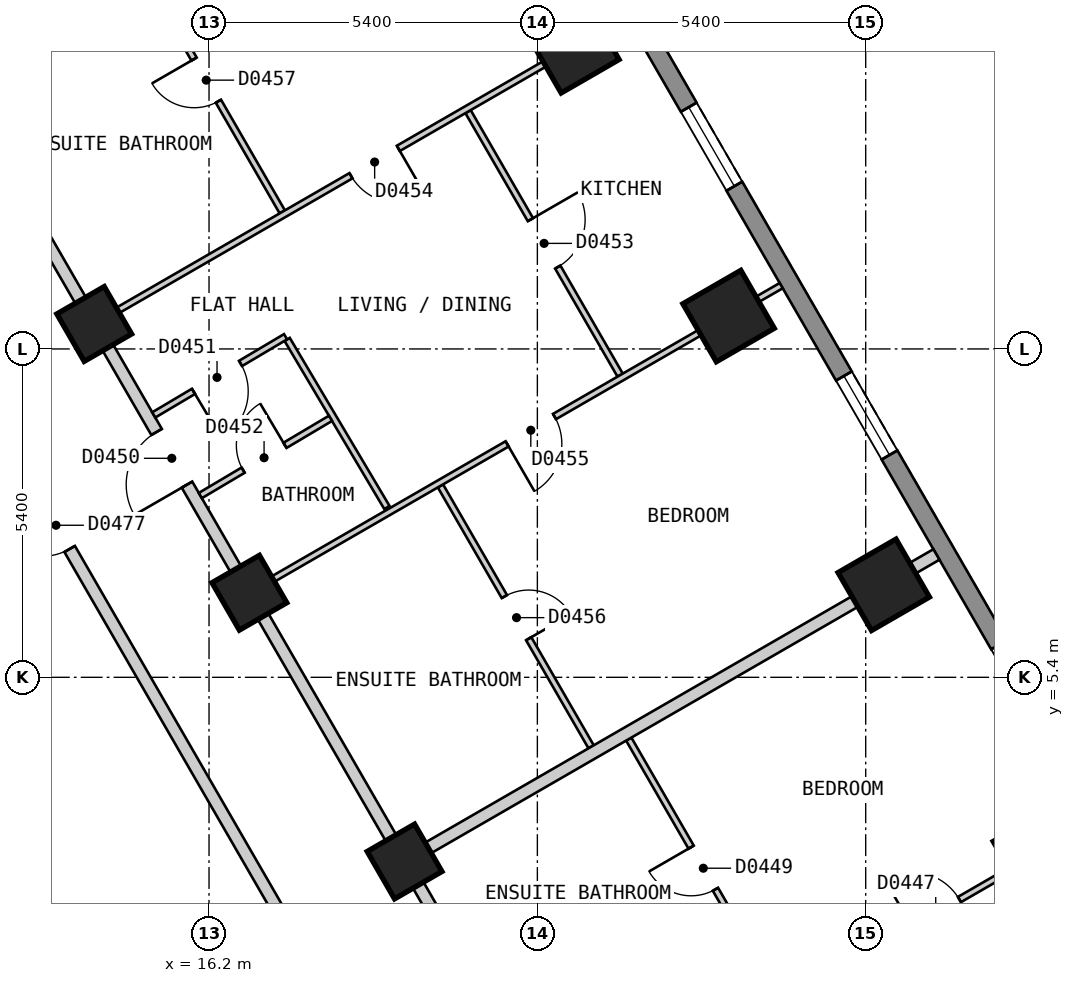
"""IFC4 building model, lengths in metres.
Left out: names, types, materials, properties, quantities, classifications, styles, units other than length and angle.
Written with IfcOpenShell. Run it as: python <this file> out.ifc"""

import sys

from ifc_helpers import new_model, si_unit, direction, frame, frame_2d, origin, origin_2d, place, context, subcontext, project, spatial, polyline, rectangle, outline, extrude, element, fill, save


model = new_model("IFC4")
c1 = context("Model", 3, precision=1e-05, world=origin(), true_north=direction((0.0, 1.0)))
c2 = subcontext(c1, "Body", "Model", "MODEL_VIEW")
j1 = project(units=[si_unit("LENGTHUNIT", "METRE"), si_unit("PLANEANGLEUNIT", "RADIAN")], contexts=[c1])
p1 = place(None, origin())
s1 = spatial("IfcSite", under=j1, at=p1, CompositionType="ELEMENT")
p2 = place(p1, origin())
s2 = spatial("IfcBuilding", under=s1, at=p2, CompositionType="ELEMENT")
p3 = place(p2, frame((0.0, 0.0, 32.4)))
s3 = spatial("IfcBuildingStorey", under=s2, at=p3, CompositionType="ELEMENT", Elevation=32.4)
for number, where, z_axis, x_axis in (
    (1, (29.848, 2.5, 0.0), (0.0, 0.0, 1.0), (-0.5, 0.866, 0.0)),
    (2, (27.297, 6.921, 0.0), (0.0, 0.0, 1.0), (-0.5, 0.866, 0.0)),
    (3, (24.745, 11.341, 0.0), (0.0, 0.0, 1.0), (-0.5, 0.866, 0.0)),
    (4, (22.193, 15.761, 0.0), (0.0, 0.0, 1.0), (-0.5, 0.866, 0.0)),
):
    element("IfcColumn", number, at=place(p3, frame(where, z_axis=z_axis, x_axis=x_axis)), inside=s3, PredefinedType="COLUMN", context=c2, shape_type="SweptSolid", body=[
        extrude(rectangle(XDim=1.1, YDim=1.1, at=origin_2d()), origin(), (0.0, 0.0, 1.0), 3.0),
    ])
for number, where, z_axis, x_axis in (
    (5, (19.416, 2.371, 0.0), (0.0, 0.0, 1.0), (-0.5, 0.866, 0.0)),
    (6, (16.864, 6.791, 0.0), (0.0, 0.0, 1.0), (-0.5, 0.866, 0.0)),
    (7, (14.312, 11.211, 0.0), (0.0, 0.0, 1.0), (-0.5, 0.866, 0.0)),
):
    element("IfcColumn", number, at=place(p3, frame(where, z_axis=z_axis, x_axis=x_axis)), inside=s3, PredefinedType="COLUMN", context=c2, shape_type="SweptSolid", body=[
        extrude(rectangle(XDim=0.9, YDim=0.9, at=origin_2d()), origin(), (0.0, 0.0, 1.0), 3.0),
    ])
p4 = place(p3, frame((31.22, 2.425, 0.0), z_axis=(0.0, 0.0, 1.0), x_axis=(-0.500001938803, 0.866024284413, 0.0)))
e8 = element("IfcWall", 8, at=p4, inside=s3, PredefinedType="SOLIDWALL", context=c2, shape_type="SweptSolid", body=[
    extrude(outline(polyline([(0.0, -0.15), (27.02, -0.15), (26.94, 0.15), (0.08, 0.15), (0.0, -0.15)])), origin(), (0.0, 0.0, 1.0), 2.7),
])
p5 = place(p4, frame((2.553, 0.0, 0.15)))
e9 = element("IfcOpeningElement", 9, at=p5, cuts=e8, PredefinedType="OPENING", context=c2, shape_type="SweptSolid", body=[
    extrude(rectangle(XDim=1.5, YDim=2.1, at=frame_2d((0.75, 1.05))), frame((0.0, 0.16, 0.0), z_axis=(0.0, -1.0, 0.0), x_axis=(1.0, 0.0, 0.0)), (0.0, 0.0, 1.0), 0.32),
])
p6 = place(p4, frame((7.657, 0.0, 0.15)))
e10 = element("IfcOpeningElement", 10, at=p6, cuts=e8, PredefinedType="OPENING", context=c2, shape_type="SweptSolid", body=[
    extrude(rectangle(XDim=1.5, YDim=2.1, at=frame_2d((0.75, 1.05))), frame((0.0, 0.16, 0.0), z_axis=(0.0, -1.0, 0.0), x_axis=(1.0, 0.0, 0.0)), (0.0, 0.0, 1.0), 0.32),
])
p7 = place(p4, frame((12.761, 0.0, 0.15)))
e11 = element("IfcOpeningElement", 11, at=p7, cuts=e8, PredefinedType="OPENING", context=c2, shape_type="SweptSolid", body=[
    extrude(rectangle(XDim=1.5, YDim=2.1, at=frame_2d((0.75, 1.05))), frame((0.0, 0.16, 0.0), z_axis=(0.0, -1.0, 0.0), x_axis=(1.0, 0.0, 0.0)), (0.0, 0.0, 1.0), 0.32),
])
p8 = place(p4, frame((17.865, 0.0, 0.15)))
e12 = element("IfcOpeningElement", 12, at=p8, cuts=e8, PredefinedType="OPENING", context=c2, shape_type="SweptSolid", body=[
    extrude(rectangle(XDim=1.5, YDim=2.1, at=frame_2d((0.75, 1.05))), frame((0.0, 0.16, 0.0), z_axis=(0.0, -1.0, 0.0), x_axis=(1.0, 0.0, 0.0)), (0.0, 0.0, 1.0), 0.32),
])
p9 = place(p4, frame((22.969, 0.0, 0.15)))
e13 = element("IfcOpeningElement", 13, at=p9, cuts=e8, PredefinedType="OPENING", context=c2, shape_type="SweptSolid", body=[
    extrude(rectangle(XDim=1.5, YDim=2.1, at=frame_2d((0.75, 1.05))), frame((0.0, 0.16, 0.0), z_axis=(0.0, -1.0, 0.0), x_axis=(1.0, 0.0, 0.0)), (0.0, 0.0, 1.0), 0.32),
])
p10 = place(p3, frame((9.18, 15.7, 0.0), z_axis=(0.0, 0.0, 1.0), x_axis=(0.500003652032, -0.866023295272, 0.0)))
e14 = element("IfcWall", 14, at=p10, inside=s3, PredefinedType="PARTITIONING", context=c2, shape_type="SweptSolid", body=[
    extrude(rectangle(XDim=18.012, YDim=0.2, at=frame_2d((9.006, 0.0))), origin(), (0.0, 0.0, 1.0), 2.7),
])
p11 = place(p10, frame((8.556, 0.0, 0.0)))
e15 = element("IfcOpeningElement", 15, at=p11, cuts=e14, PredefinedType="OPENING", context=c2, shape_type="SweptSolid", body=[
    extrude(rectangle(XDim=0.9, YDim=2.1, at=frame_2d((0.45, 1.05))), frame((0.0, 0.11, 0.0), z_axis=(0.0, -1.0, 0.0), x_axis=(1.0, 0.0, 0.0)), (0.0, 0.0, 1.0), 0.22),
])
p12 = place(p3, frame((10.45, 17.9, 0.0), z_axis=(0.0, 0.0, 1.0), x_axis=(0.500034352617, -0.866005569383, 0.0)))
e16 = element("IfcWall", 16, at=p12, inside=s3, PredefinedType="PARTITIONING", context=c2, shape_type="SweptSolid", body=[
    extrude(rectangle(XDim=20.553, YDim=0.2, at=frame_2d((10.276, 0.0))), origin(), (0.0, 0.0, 1.0), 2.7),
])
p13 = place(p12, frame((9.775, 0.0, 0.0)))
e17 = element("IfcOpeningElement", 17, at=p13, cuts=e16, PredefinedType="OPENING", context=c2, shape_type="SweptSolid", body=[
    extrude(rectangle(XDim=1.0, YDim=2.1, at=frame_2d((0.5, 1.05))), frame((0.0, 0.11, 0.0), z_axis=(0.0, -1.0, 0.0), x_axis=(1.0, 0.0, 0.0)), (0.0, 0.0, 1.0), 0.22),
])
p14 = place(p12, frame((0.852, 0.0, 0.0)))
e18 = element("IfcOpeningElement", 18, at=p14, cuts=e16, PredefinedType="OPENING", context=c2, shape_type="SweptSolid", body=[
    extrude(rectangle(XDim=0.8, YDim=2.1, at=frame_2d((0.4, 1.05))), frame((0.0, 0.11, 0.0), z_axis=(0.0, -1.0, 0.0), x_axis=(1.0, 0.0, 0.0)), (0.0, 0.0, 1.0), 0.22),
])
p15 = place(p3, frame((17.485, 10.957, 0.0), z_axis=(0.0, 0.0, 1.0), x_axis=(0.510324709283, -0.859981796956, 0.0)))
e19 = element("IfcWall", 19, at=p15, inside=s3, PredefinedType="PARTITIONING", context=c2, shape_type="SweptSolid", body=[
    extrude(rectangle(XDim=3.215, YDim=0.1, at=frame_2d((1.608, 0.0))), origin(), (0.0, 0.0, 1.0), 2.7),
])
p16 = place(p3, frame((14.928, 17.344, 0.0), z_axis=(0.0, 0.0, 1.0), x_axis=(0.500029609304, -0.86600830817, 0.0)))
e20 = element("IfcWall", 20, at=p16, inside=s3, PredefinedType="PARTITIONING", context=c2, shape_type="SweptSolid", body=[
    extrude(rectangle(XDim=4.954, YDim=0.1, at=frame_2d((2.477, 0.0))), origin(), (0.0, 0.0, 1.0), 2.7),
])
p17 = place(p16, frame((2.052, 0.0, 0.0)))
e21 = element("IfcOpeningElement", 21, at=p17, cuts=e20, PredefinedType="OPENING", context=c2, shape_type="SweptSolid", body=[
    extrude(rectangle(XDim=0.8, YDim=2.1, at=frame_2d((0.4, 1.05))), frame((0.0, 0.06, 0.0), z_axis=(0.0, -1.0, 0.0), x_axis=(1.0, 0.0, 0.0)), (0.0, 0.0, 1.0), 0.12),
])
p18 = place(p3, frame((20.006, 8.548, 0.0), z_axis=(0.0, 0.0, 1.0), x_axis=(0.500055121407, -0.865993577086, 0.0)))
e22 = element("IfcWall", 22, at=p18, inside=s3, PredefinedType="PARTITIONING", context=c2, shape_type="SweptSolid", body=[
    extrude(rectangle(XDim=4.955, YDim=0.1, at=frame_2d((2.478, 0.0))), origin(), (0.0, 0.0, 1.0), 2.7),
])
p19 = place(p18, frame((2.102, 0.0, 0.0)))
e23 = element("IfcOpeningElement", 23, at=p19, cuts=e22, PredefinedType="OPENING", context=c2, shape_type="SweptSolid", body=[
    extrude(rectangle(XDim=0.8, YDim=2.1, at=frame_2d((0.4, 1.05))), frame((0.0, 0.06, 0.0), z_axis=(0.0, -1.0, 0.0), x_axis=(1.0, 0.0, 0.0)), (0.0, 0.0, 1.0), 0.12),
])
p20 = place(p3, frame((23.103, 4.384, 0.0), z_axis=(0.0, 0.0, 1.0), x_axis=(0.500029609304, -0.86600830817, 0.0)))
e24 = element("IfcWall", 24, at=p20, inside=s3, PredefinedType="PARTITIONING", context=c2, shape_type="SweptSolid", body=[
    extrude(rectangle(XDim=4.954, YDim=0.1, at=frame_2d((2.477, 0.0))), origin(), (0.0, 0.0, 1.0), 2.7),
])
p21 = place(p20, frame((2.052, 0.0, 0.0)))
e25 = element("IfcOpeningElement", 25, at=p21, cuts=e24, PredefinedType="OPENING", context=c2, shape_type="SweptSolid", body=[
    extrude(rectangle(XDim=0.8, YDim=2.1, at=frame_2d((0.4, 1.05))), frame((0.0, 0.06, 0.0), z_axis=(0.0, -1.0, 0.0), x_axis=(1.0, 0.0, 0.0)), (0.0, 0.0, 1.0), 0.12),
])
p22 = place(p3, frame((20.46, 14.703, 0.0), z_axis=(0.0, 0.0, 1.0), x_axis=(0.499918186652, -0.866072633591, 0.0)))
e26 = element("IfcWall", 26, at=p22, inside=s3, PredefinedType="PARTITIONING", context=c2, shape_type="SweptSolid", body=[
    extrude(rectangle(XDim=5.003, YDim=0.1, at=frame_2d((2.501, 0.0))), origin(), (0.0, 0.0, 1.0), 2.7),
])
p23 = place(p22, frame((2.052, 0.0, 0.0)))
e27 = element("IfcOpeningElement", 27, at=p23, cuts=e26, PredefinedType="OPENING", context=c2, shape_type="SweptSolid", body=[
    extrude(rectangle(XDim=0.9, YDim=2.1, at=frame_2d((0.45, 1.05))), frame((0.0, 0.06, 0.0), z_axis=(0.0, -1.0, 0.0), x_axis=(1.0, 0.0, 0.0)), (0.0, 0.0, 1.0), 0.12),
])
p24 = place(p3, frame((25.588, 0.041, 0.0), z_axis=(0.0, 0.0, 1.0), x_axis=(0.866113484451, 0.499847408768, 0.0)))
e28 = element("IfcWall", 28, at=p24, inside=s3, PredefinedType="PARTITIONING", context=c2, shape_type="SweptSolid", body=[
    extrude(rectangle(XDim=5.92, YDim=0.1, at=frame_2d((2.96, 0.0))), origin(), (0.0, 0.0, 1.0), 2.7),
])
p25 = place(p24, frame((2.51, 0.0, 0.0)))
e29 = element("IfcOpeningElement", 29, at=p25, cuts=e28, PredefinedType="OPENING", context=c2, shape_type="SweptSolid", body=[
    extrude(rectangle(XDim=0.9, YDim=2.1, at=frame_2d((0.45, 1.05))), frame((0.0, 0.06, 0.0), z_axis=(0.0, -1.0, 0.0), x_axis=(1.0, 0.0, 0.0)), (0.0, 0.0, 1.0), 0.12),
])
p26 = place(p3, frame((16.95, 6.841, 0.0), z_axis=(0.0, 0.0, 1.0), x_axis=(0.866022959057, 0.500004234368, 0.0)))
e30 = element("IfcWall", 30, at=p26, inside=s3, PredefinedType="PARTITIONING", context=c2, shape_type="SweptSolid", body=[
    extrude(rectangle(XDim=10.0, YDim=0.1, at=frame_2d((5.0, 0.0))), origin(), (0.0, 0.0, 1.0), 2.7),
])
p27 = place(p26, frame((4.795, 0.0, 0.0)))
e31 = element("IfcOpeningElement", 31, at=p27, cuts=e30, PredefinedType="OPENING", context=c2, shape_type="SweptSolid", body=[
    extrude(rectangle(XDim=0.9, YDim=2.1, at=frame_2d((0.45, 1.05))), frame((0.0, 0.06, 0.0), z_axis=(0.0, -1.0, 0.0), x_axis=(1.0, 0.0, 0.0)), (0.0, 0.0, 1.0), 0.12),
])
p28 = place(p3, frame((14.399, 11.261, 0.0), z_axis=(0.0, 0.0, 1.0), x_axis=(0.866022959057, 0.500004234368, 0.0)))
e32 = element("IfcWall", 32, at=p28, inside=s3, PredefinedType="PARTITIONING", context=c2, shape_type="SweptSolid", body=[
    extrude(rectangle(XDim=10.0, YDim=0.1, at=frame_2d((5.0, 0.0))), origin(), (0.0, 0.0, 1.0), 2.7),
])
p29 = place(p28, frame((4.775, 0.0, 0.0)))
e33 = element("IfcOpeningElement", 33, at=p29, cuts=e32, PredefinedType="OPENING", context=c2, shape_type="SweptSolid", body=[
    extrude(rectangle(XDim=0.9, YDim=2.1, at=frame_2d((0.45, 1.05))), frame((0.0, 0.06, 0.0), z_axis=(0.0, -1.0, 0.0), x_axis=(1.0, 0.0, 0.0)), (0.0, 0.0, 1.0), 0.12),
])
p30 = place(p3, frame((16.057, 8.389, 0.0), z_axis=(0.0, 0.0, 1.0), x_axis=(0.860077993161, 0.510162567893, 0.0)))
e34 = element("IfcWall", 34, at=p30, inside=s3, PredefinedType="PARTITIONING", context=c2, shape_type="SweptSolid", body=[
    extrude(rectangle(XDim=2.49, YDim=0.1, at=frame_2d((1.245, 0.0))), origin(), (0.0, 0.0, 1.0), 2.7),
])
p31 = place(p30, frame((0.819, 0.0, 0.0)))
e35 = element("IfcOpeningElement", 35, at=p31, cuts=e34, PredefinedType="OPENING", context=c2, shape_type="SweptSolid", body=[
    extrude(rectangle(XDim=0.8, YDim=2.1, at=frame_2d((0.4, 1.05))), frame((0.0, 0.06, 0.0), z_axis=(0.0, -1.0, 0.0), x_axis=(1.0, 0.0, 0.0)), (0.0, 0.0, 1.0), 0.12),
])
p32 = place(p3, frame((15.291, 9.715, 0.0), z_axis=(0.0, 0.0, 1.0), x_axis=(0.860088508644, 0.51014483953, 0.0)))
e36 = element("IfcWall", 36, at=p32, inside=s3, PredefinedType="PARTITIONING", context=c2, shape_type="SweptSolid", body=[
    extrude(rectangle(XDim=2.521, YDim=0.1, at=frame_2d((1.26, 0.0))), origin(), (0.0, 0.0, 1.0), 2.7),
])
p33 = place(p32, frame((0.76, 0.0, 0.0)))
e37 = element("IfcOpeningElement", 37, at=p33, cuts=e36, PredefinedType="OPENING", context=c2, shape_type="SweptSolid", body=[
    extrude(rectangle(XDim=0.9, YDim=2.1, at=frame_2d((0.45, 1.05))), frame((0.0, 0.06, 0.0), z_axis=(0.0, -1.0, 0.0), x_axis=(1.0, 0.0, 0.0)), (0.0, 0.0, 1.0), 0.12),
])
p34 = place(p3, frame((19.503, 2.421, 0.0), z_axis=(0.0, 0.0, 1.0), x_axis=(0.866065245018, 0.499930986609, 0.0)))
e38 = element("IfcWall", 38, at=p34, inside=s3, PredefinedType="PARTITIONING", context=c2, shape_type="SweptSolid", body=[
    extrude(rectangle(XDim=10.0, YDim=0.2, at=frame_2d((5.0, 0.0))), origin(), (0.0, 0.0, 1.0), 2.7),
])
p35 = place(p3, frame((11.847, 15.681, 0.0), z_axis=(0.0, 0.0, 1.0), x_axis=(0.866022959057, 0.500004234368, 0.0)))
e39 = element("IfcWall", 39, at=p35, inside=s3, PredefinedType="PARTITIONING", context=c2, shape_type="SweptSolid", body=[
    extrude(rectangle(XDim=10.0, YDim=0.2, at=frame_2d((5.0, 0.0))), origin(), (0.0, 0.0, 1.0), 2.7),
])
p36 = place(p6, origin())
e40 = element("IfcWindow", 40, at=p36, inside=s3, PartitioningType="SINGLE_PANEL", PredefinedType="WINDOW", context=c2, shape_type="SweptSolid", body=[
    extrude(rectangle(XDim=1.5, YDim=2.1, at=frame_2d((0.75, 1.05))), frame((0.0, 0.03, 0.0), z_axis=(0.0, -1.0, 0.0), x_axis=(1.0, 0.0, 0.0)), (0.0, 0.0, 1.0), 0.06),
])
fill(e10, e40)
p37 = place(p7, origin())
e41 = element("IfcWindow", 41, at=p37, inside=s3, PartitioningType="SINGLE_PANEL", PredefinedType="WINDOW", context=c2, shape_type="SweptSolid", body=[
    extrude(rectangle(XDim=1.5, YDim=2.1, at=frame_2d((0.75, 1.05))), frame((0.0, 0.03, 0.0), z_axis=(0.0, -1.0, 0.0), x_axis=(1.0, 0.0, 0.0)), (0.0, 0.0, 1.0), 0.06),
])
fill(e11, e41)
p38 = place(p25, origin())
e42 = element("IfcDoor", 42, at=p38, inside=s3, OperationType="SINGLE_SWING_LEFT", PredefinedType="DOOR", context=c2, shape_type="SweptSolid", body=[
    extrude(rectangle(XDim=0.9, YDim=2.1, at=frame_2d((0.45, 1.05))), frame((0.0, 0.025, 0.0), z_axis=(0.0, -1.0, 0.0), x_axis=(1.0, 0.0, 0.0)), (0.0, 0.0, 1.0), 0.05),
])
fill(e29, e42)
p39 = place(p21, origin())
e43 = element("IfcDoor", 43, at=p39, inside=s3, OperationType="SINGLE_SWING_LEFT", PredefinedType="DOOR", context=c2, shape_type="SweptSolid", body=[
    extrude(rectangle(XDim=0.8, YDim=2.1, at=frame_2d((0.4, 1.05))), frame((0.0, 0.025, 0.0), z_axis=(0.0, -1.0, 0.0), x_axis=(1.0, 0.0, 0.0)), (0.0, 0.0, 1.0), 0.05),
])
fill(e25, e43)
p40 = place(p13, origin())
e44 = element("IfcDoor", 44, at=p40, inside=s3, OperationType="SINGLE_SWING_RIGHT", PredefinedType="DOOR", context=c2, shape_type="SweptSolid", body=[
    extrude(rectangle(XDim=1.0, YDim=2.1, at=frame_2d((0.5, 1.05))), frame((0.0, 0.025, 0.0), z_axis=(0.0, -1.0, 0.0), x_axis=(1.0, 0.0, 0.0)), (0.0, 0.0, 1.0), 0.05),
])
fill(e17, e44)
p41 = place(p33, origin())
e45 = element("IfcDoor", 45, at=p41, inside=s3, OperationType="SINGLE_SWING_LEFT", PredefinedType="DOOR", context=c2, shape_type="SweptSolid", body=[
    extrude(rectangle(XDim=0.9, YDim=2.1, at=frame_2d((0.45, 1.05))), frame((0.0, 0.025, 0.0), z_axis=(0.0, -1.0, 0.0), x_axis=(1.0, 0.0, 0.0)), (0.0, 0.0, 1.0), 0.05),
])
fill(e37, e45)
p42 = place(p31, origin())
e46 = element("IfcDoor", 46, at=p42, inside=s3, OperationType="SINGLE_SWING_RIGHT", PredefinedType="DOOR", context=c2, shape_type="SweptSolid", body=[
    extrude(rectangle(XDim=0.8, YDim=2.1, at=frame_2d((0.4, 1.05))), frame((0.0, 0.025, 0.0), z_axis=(0.0, -1.0, 0.0), x_axis=(1.0, 0.0, 0.0)), (0.0, 0.0, 1.0), 0.05),
])
fill(e35, e46)
p43 = place(p23, origin())
e47 = element("IfcDoor", 47, at=p43, inside=s3, OperationType="SINGLE_SWING_LEFT", PredefinedType="DOOR", context=c2, shape_type="SweptSolid", body=[
    extrude(rectangle(XDim=0.9, YDim=2.1, at=frame_2d((0.45, 1.05))), frame((0.0, 0.025, 0.0), z_axis=(0.0, -1.0, 0.0), x_axis=(1.0, 0.0, 0.0)), (0.0, 0.0, 1.0), 0.05),
])
fill(e27, e47)
p44 = place(p29, origin())
e48 = element("IfcDoor", 48, at=p44, inside=s3, OperationType="SINGLE_SWING_RIGHT", PredefinedType="DOOR", context=c2, shape_type="SweptSolid", body=[
    extrude(rectangle(XDim=0.9, YDim=2.1, at=frame_2d((0.45, 1.05))), frame((0.0, 0.025, 0.0), z_axis=(0.0, -1.0, 0.0), x_axis=(1.0, 0.0, 0.0)), (0.0, 0.0, 1.0), 0.05),
])
fill(e33, e48)
p45 = place(p27, origin())
e49 = element("IfcDoor", 49, at=p45, inside=s3, OperationType="SINGLE_SWING_LEFT", PredefinedType="DOOR", context=c2, shape_type="SweptSolid", body=[
    extrude(rectangle(XDim=0.9, YDim=2.1, at=frame_2d((0.45, 1.05))), frame((0.0, 0.025, 0.0), z_axis=(0.0, -1.0, 0.0), x_axis=(1.0, 0.0, 0.0)), (0.0, 0.0, 1.0), 0.05),
])
fill(e31, e49)
p46 = place(p19, origin())
e50 = element("IfcDoor", 50, at=p46, inside=s3, OperationType="SINGLE_SWING_RIGHT", PredefinedType="DOOR", context=c2, shape_type="SweptSolid", body=[
    extrude(rectangle(XDim=0.8, YDim=2.1, at=frame_2d((0.4, 1.05))), frame((0.0, 0.025, 0.0), z_axis=(0.0, -1.0, 0.0), x_axis=(1.0, 0.0, 0.0)), (0.0, 0.0, 1.0), 0.05),
])
fill(e23, e50)
p47 = place(p17, origin())
e51 = element("IfcDoor", 51, at=p47, inside=s3, OperationType="SINGLE_SWING_LEFT", PredefinedType="DOOR", context=c2, shape_type="SweptSolid", body=[
    extrude(rectangle(XDim=0.8, YDim=2.1, at=frame_2d((0.4, 1.05))), frame((0.0, 0.025, 0.0), z_axis=(0.0, -1.0, 0.0), x_axis=(1.0, 0.0, 0.0)), (0.0, 0.0, 1.0), 0.05),
])
fill(e21, e51)
p48 = place(p11, origin())
e52 = element("IfcDoor", 52, at=p48, inside=s3, OperationType="SINGLE_SWING_LEFT", PredefinedType="DOOR", context=c2, shape_type="SweptSolid", body=[
    extrude(rectangle(XDim=0.9, YDim=2.1, at=frame_2d((0.45, 1.05))), frame((0.0, 0.025, 0.0), z_axis=(0.0, -1.0, 0.0), x_axis=(1.0, 0.0, 0.0)), (0.0, 0.0, 1.0), 0.05),
])
fill(e15, e52)
save(model, sys.argv[1])
